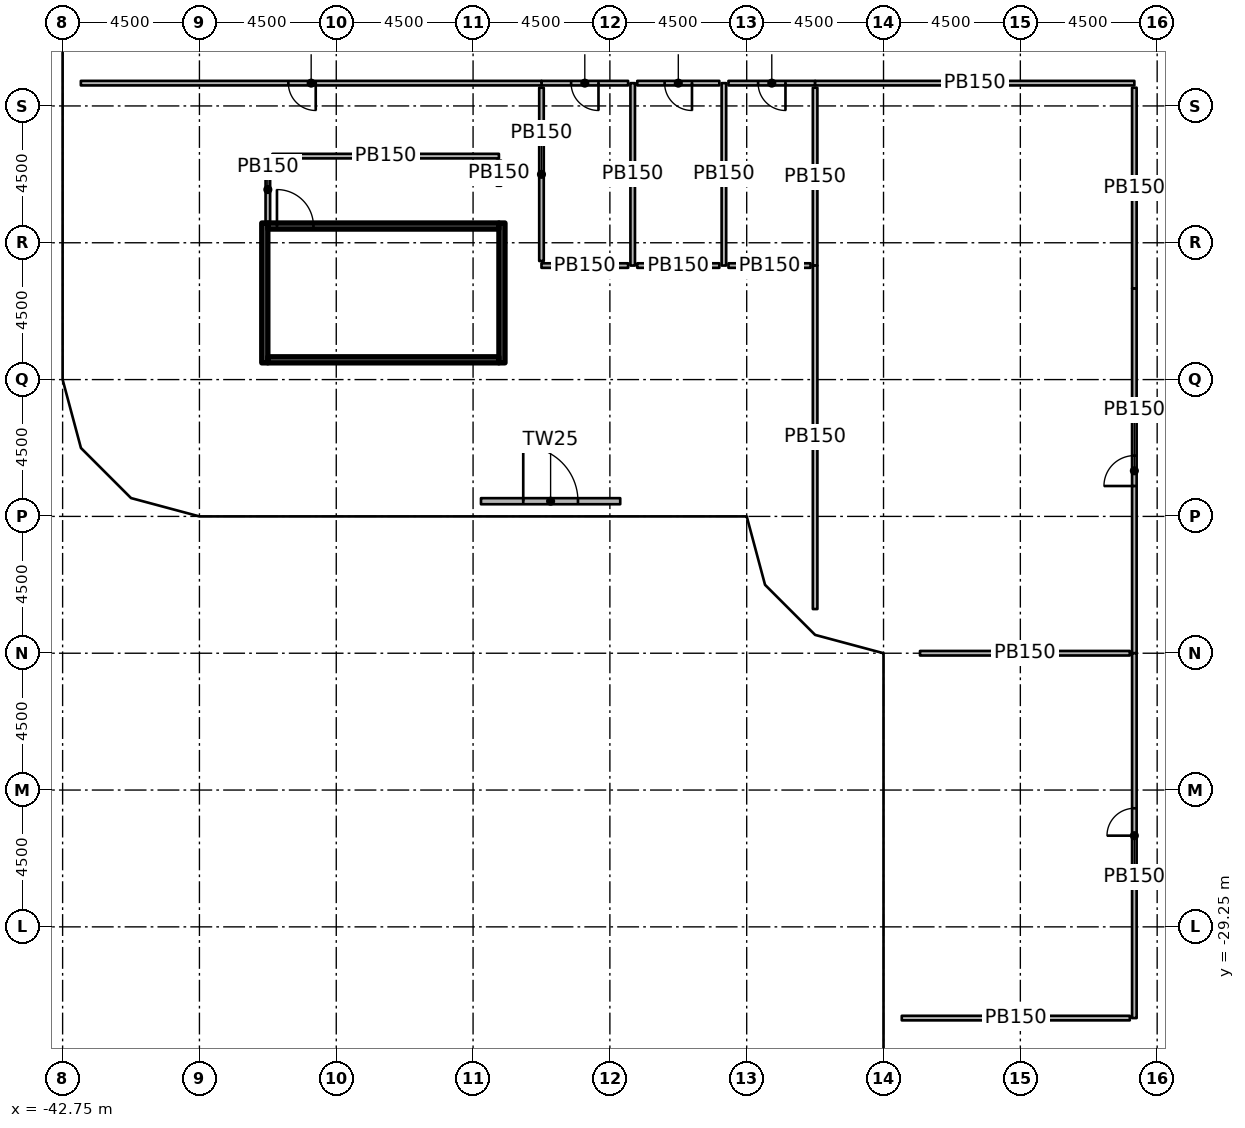
"""IFC4 building model, lengths in metres.
Left out: names, types, materials, properties, quantities, classifications, styles, units other than length and angle.
Written with IfcOpenShell. Run it as: python <this file> out.ifc"""

import sys

from ifc_helpers import new_model, si_unit, direction, frame, frame_2d, origin, origin_2d, place, context, subcontext, project, spatial, rectangle, extrude, element, fill, save


model = new_model("IFC4")
c1 = context("Model", 3, precision=1e-05, world=origin(), true_north=direction((0.0, 1.0)))
c2 = subcontext(c1, "Body", "Model", "MODEL_VIEW")
j1 = project(units=[si_unit("LENGTHUNIT", "METRE"), si_unit("PLANEANGLEUNIT", "RADIAN")], contexts=[c1])
p1 = place(None, origin())
s1 = spatial("IfcSite", under=j1, at=p1, CompositionType="ELEMENT")
p2 = place(p1, origin())
s2 = spatial("IfcBuilding", under=s1, at=p2, CompositionType="ELEMENT")
p3 = place(p2, frame((0.0, 0.0, 17.0)))
s3 = spatial("IfcBuildingStorey", under=s2, at=p3, CompositionType="ELEMENT", Elevation=17.0)
for number, where, z_axis, x_axis in (
    (1, (-33.75, -15.15, 0.0), (0.0, 0.0, 1.0), (1.0, 0.0, 0.0)),
    (2, (-33.11, -2.25, 0.0), (0.0, 0.0, 1.0), (1.0, 0.0, 0.0)),
    (3, (-28.908, -5.475, 0.0), (0.0, 0.0, 1.0), (1.0, 0.0, 0.0)),
    (4, (-24.75, -10.65, 0.0), (0.0, 0.0, 1.0), (1.0, 0.0, 0.0)),
    (5, (-24.75, -6.25, 0.0), (0.0, 0.0, 1.0), (1.0, 0.0, 0.0)),
    (6, (-19.65, -15.15, 0.0), (0.0, 0.0, 1.0), (1.0, 0.0, 0.0)),
    (7, (-20.25, -6.11, 0.0), (0.0, 0.0, 1.0), (1.0, 0.0, 0.0)),
    (8, (-15.15, -33.75, 0.0), (0.0, 0.0, 1.0), (1.0, 0.0, 0.0)),
    (9, (-15.15, -19.65, 0.0), (0.0, 0.0, 1.0), (1.0, 0.0, 0.0)),
    (10, (-15.15, -10.65, 0.0), (0.0, 0.0, 1.0), (1.0, 0.0, 0.0)),
    (11, (-15.75, -6.25, 0.0), (0.0, 0.0, 1.0), (1.0, 0.0, 0.0)),
    (12, (-10.65, -24.75, 0.0), (0.0, 0.0, 1.0), (1.0, 0.0, 0.0)),
    (13, (-10.65, -15.15, 0.0), (0.0, 0.0, 1.0), (1.0, 0.0, 0.0)),
    (14, (-10.75, -6.25, 0.0), (0.0, 0.0, 1.0), (1.0, 0.0, 0.0)),
    (15, (-6.25, -26.9, 0.0), (0.0, 0.0, 1.0), (1.0, 0.0, 0.0)),
    (16, (-6.25, -24.65, 0.0), (0.0, 0.0, 1.0), (1.0, 0.0, 0.0)),
    (17, (-6.25, -20.25, 0.0), (0.0, 0.0, 1.0), (1.0, 0.0, 0.0)),
    (18, (-6.25, -15.75, 0.0), (0.0, 0.0, 1.0), (1.0, 0.0, 0.0)),
    (19, (-6.25, -10.75, 0.0), (0.0, 0.0, 1.0), (1.0, 0.0, 0.0)),
    (20, (-6.25, -6.25, 0.0), (0.0, 0.0, 1.0), (1.0, 0.0, 0.0)),
):
    element("IfcColumn", number, at=place(p3, frame(where, z_axis=z_axis, x_axis=x_axis)), inside=s3, PredefinedType="COLUMN", context=c2, shape_type="SweptSolid", body=[
        extrude(rectangle(XDim=1.2, YDim=1.2, at=origin_2d()), origin(), (0.0, 0.0, 1.0), 4.55),
    ])
p4 = place(p3, frame((-28.99, -15.25, 0.0), z_axis=(0.0, 0.0, 1.0), x_axis=(1.0, 0.0, 0.0)))
e21 = element("IfcWall", 21, at=p4, inside=s3, PredefinedType="SOLIDWALL", context=c2, shape_type="SweptSolid", body=[
    extrude(rectangle(XDim=4.58, YDim=0.2, at=frame_2d((2.29, 0.0))), origin(), (0.0, 0.0, 1.0), 4.55),
])
p5 = place(p4, frame((1.39, 0.0, 0.0)))
e22 = element("IfcOpeningElement", 22, at=p5, cuts=e21, PredefinedType="OPENING", context=c2, shape_type="SweptSolid", body=[
    extrude(rectangle(XDim=1.8, YDim=2.4, at=frame_2d((0.9, 1.2))), frame((0.0, 0.11, 0.0), z_axis=(0.0, -1.0, 0.0), x_axis=(1.0, 0.0, 0.0)), (0.0, 0.0, 1.0), 0.22),
])
for number, where, z_axis, x_axis in (
    (23, (-36.1, -10.7, 0.0), (0.0, 0.0, 1.0), (0.0, 1.0, 0.0)),
    (24, (-28.3, -10.7, 0.0), (0.0, 0.0, 1.0), (0.0, 1.0, 0.0)),
):
    element("IfcWall", number, at=place(p3, frame(where, z_axis=z_axis, x_axis=x_axis)), inside=s3, PredefinedType="SHEAR", context=c2, shape_type="SweptSolid", body=[
        extrude(rectangle(XDim=4.6, YDim=0.2, at=frame_2d((2.3, 0.0))), origin(), (0.0, 0.0, 1.0), 4.55),
    ])
p6 = place(p3, frame((-36.0, -10.6, 0.0), z_axis=(0.0, 0.0, 1.0), x_axis=(1.0, 0.0, 0.0)))
e25 = element("IfcWall", 25, at=p6, inside=s3, PredefinedType="SHEAR", context=c2, shape_type="SweptSolid", body=[
    extrude(rectangle(XDim=7.6, YDim=0.2, at=frame_2d((3.8, 0.0))), origin(), (0.0, 0.0, 1.0), 4.55),
])
p7 = place(p3, frame((-36.0, -6.2, 0.0), z_axis=(0.0, 0.0, 1.0), x_axis=(1.0, 0.0, 0.0)))
e26 = element("IfcWall", 26, at=p7, inside=s3, PredefinedType="SHEAR", context=c2, shape_type="SweptSolid", body=[
    extrude(rectangle(XDim=7.6, YDim=0.2, at=frame_2d((3.8, 0.0))), origin(), (0.0, 0.0, 1.0), 4.55),
])
p8 = place(p7, frame((0.3, 0.0, 0.0)))
e27 = element("IfcOpeningElement", 27, at=p8, cuts=e26, PredefinedType="OPENING", context=c2, shape_type="SweptSolid", body=[
    extrude(rectangle(XDim=1.2, YDim=2.1, at=frame_2d((0.6, 1.05))), frame((0.0, 0.11, 0.0), z_axis=(0.0, -1.0, 0.0), x_axis=(1.0, 0.0, 0.0)), (0.0, 0.0, 1.0), 0.22),
])
p9 = place(p3, frame((-36.0, -6.1, 0.0), z_axis=(0.0, 0.0, 1.0), x_axis=(0.0, 1.0, 0.0)))
e28 = element("IfcWall", 28, at=p9, inside=s3, PredefinedType="PARTITIONING", context=c2, shape_type="SweptSolid", body=[
    extrude(rectangle(XDim=2.2, YDim=0.15, at=frame_2d((1.1, 0.0))), origin(), (0.0, 0.0, 1.0), 4.55),
])
p10 = place(p3, frame((-35.85, -3.9, 0.0), z_axis=(0.0, 0.0, 1.0), x_axis=(1.0, 0.0, 0.0)))
e29 = element("IfcWall", 29, at=p10, inside=s3, PredefinedType="PARTITIONING", context=c2, shape_type="SweptSolid", body=[
    extrude(rectangle(XDim=7.45, YDim=0.15, at=frame_2d((3.725, 0.0))), origin(), (0.0, 0.0, 1.0), 4.55),
])
p11 = place(p3, frame((-28.4, -4.05, 0.0), z_axis=(0.0, 0.0, 1.0), x_axis=(0.0, -1.0, 0.0)))
e30 = element("IfcWall", 30, at=p11, inside=s3, PredefinedType="PARTITIONING", context=c2, shape_type="SweptSolid", body=[
    extrude(rectangle(XDim=0.825, YDim=0.15, at=frame_2d((0.413, 0.0))), origin(), (0.0, 0.0, 1.0), 4.55),
])
p12 = place(p3, frame((-24.0, -1.5, 0.0), z_axis=(0.0, 0.0, 1.0), x_axis=(0.0, -1.0, 0.0)))
e31 = element("IfcWall", 31, at=p12, inside=s3, PredefinedType="PARTITIONING", context=c2, shape_type="SweptSolid", body=[
    extrude(rectangle(XDim=6.0, YDim=0.15, at=frame_2d((3.0, 0.0))), origin(), (0.0, 0.0, 1.0), 4.55),
])
p13 = place(p3, frame((-24.15, -1.5, 0.0), z_axis=(0.0, 0.0, 1.0), x_axis=(-1.0, 0.0, 0.0)))
e32 = element("IfcWall", 32, at=p13, inside=s3, PredefinedType="PARTITIONING", context=c2, shape_type="SweptSolid", body=[
    extrude(rectangle(XDim=2.85, YDim=0.15, at=frame_2d((1.425, 0.0))), origin(), (0.0, 0.0, 1.0), 4.55),
])
p14 = place(p13, frame((0.975, 0.0, 0.0)))
e33 = element("IfcOpeningElement", 33, at=p14, cuts=e32, PredefinedType="OPENING", context=c2, shape_type="SweptSolid", body=[
    extrude(rectangle(XDim=0.9, YDim=2.1, at=frame_2d((0.45, 1.05))), frame((0.0, 0.085, 0.0), z_axis=(0.0, -1.0, 0.0), x_axis=(1.0, 0.0, 0.0)), (0.0, 0.0, 1.0), 0.17),
])
p15 = place(p3, frame((-24.15, -7.5, 0.0), z_axis=(0.0, 0.0, 1.0), x_axis=(-1.0, 0.0, 0.0)))
e34 = element("IfcWall", 34, at=p15, inside=s3, PredefinedType="PARTITIONING", context=c2, shape_type="SweptSolid", body=[
    extrude(rectangle(XDim=2.85, YDim=0.15, at=frame_2d((1.425, 0.0))), origin(), (0.0, 0.0, 1.0), 4.55),
])
p16 = place(p3, frame((-27.0, -7.35, 0.0), z_axis=(0.0, 0.0, 1.0), x_axis=(0.0, 1.0, 0.0)))
e35 = element("IfcWall", 35, at=p16, inside=s3, PredefinedType="PARTITIONING", context=c2, shape_type="SweptSolid", body=[
    extrude(rectangle(XDim=5.7, YDim=0.15, at=frame_2d((2.85, 0.0))), origin(), (0.0, 0.0, 1.0), 4.55),
])
p17 = place(p3, frame((-21.0, -1.5, 0.0), z_axis=(0.0, 0.0, 1.0), x_axis=(0.0, -1.0, 0.0)))
e36 = element("IfcWall", 36, at=p17, inside=s3, PredefinedType="PARTITIONING", context=c2, shape_type="SweptSolid", body=[
    extrude(rectangle(XDim=6.0, YDim=0.15, at=frame_2d((3.0, 0.0))), origin(), (0.0, 0.0, 1.0), 4.55),
])
p18 = place(p3, frame((-21.15, -1.5, 0.0), z_axis=(0.0, 0.0, 1.0), x_axis=(-1.0, 0.0, 0.0)))
e37 = element("IfcWall", 37, at=p18, inside=s3, PredefinedType="PARTITIONING", context=c2, shape_type="SweptSolid", body=[
    extrude(rectangle(XDim=2.7, YDim=0.15, at=frame_2d((1.35, 0.0))), origin(), (0.0, 0.0, 1.0), 4.55),
])
p19 = place(p18, frame((0.9, 0.0, 0.0)))
e38 = element("IfcOpeningElement", 38, at=p19, cuts=e37, PredefinedType="OPENING", context=c2, shape_type="SweptSolid", body=[
    extrude(rectangle(XDim=0.9, YDim=2.1, at=frame_2d((0.45, 1.05))), frame((0.0, 0.085, 0.0), z_axis=(0.0, -1.0, 0.0), x_axis=(1.0, 0.0, 0.0)), (0.0, 0.0, 1.0), 0.17),
])
p20 = place(p3, frame((-21.15, -7.5, 0.0), z_axis=(0.0, 0.0, 1.0), x_axis=(-1.0, 0.0, 0.0)))
e39 = element("IfcWall", 39, at=p20, inside=s3, PredefinedType="PARTITIONING", context=c2, shape_type="SweptSolid", body=[
    extrude(rectangle(XDim=2.7, YDim=0.15, at=frame_2d((1.35, 0.0))), origin(), (0.0, 0.0, 1.0), 4.55),
])
p21 = place(p3, frame((-18.0, -1.5, 0.0), z_axis=(0.0, 0.0, 1.0), x_axis=(-1.0, 0.0, 0.0)))
e40 = element("IfcWall", 40, at=p21, inside=s3, PredefinedType="PARTITIONING", context=c2, shape_type="SweptSolid", body=[
    extrude(rectangle(XDim=2.85, YDim=0.15, at=frame_2d((1.425, 0.0))), origin(), (0.0, 0.0, 1.0), 4.55),
])
p22 = place(p21, frame((0.975, 0.0, 0.0)))
e41 = element("IfcOpeningElement", 41, at=p22, cuts=e40, PredefinedType="OPENING", context=c2, shape_type="SweptSolid", body=[
    extrude(rectangle(XDim=0.9, YDim=2.1, at=frame_2d((0.45, 1.05))), frame((0.0, 0.085, 0.0), z_axis=(0.0, -1.0, 0.0), x_axis=(1.0, 0.0, 0.0)), (0.0, 0.0, 1.0), 0.17),
])
p23 = place(p3, frame((-18.0, -1.65, 0.0), z_axis=(0.0, 0.0, 1.0), x_axis=(0.0, -1.0, 0.0)))
e42 = element("IfcWall", 42, at=p23, inside=s3, PredefinedType="PARTITIONING", context=c2, shape_type="SweptSolid", body=[
    extrude(rectangle(XDim=5.85, YDim=0.15, at=frame_2d((2.925, 0.0))), origin(), (0.0, 0.0, 1.0), 4.55),
])
p24 = place(p3, frame((-18.15, -7.5, 0.0), z_axis=(0.0, 0.0, 1.0), x_axis=(-1.0, 0.0, 0.0)))
e43 = element("IfcWall", 43, at=p24, inside=s3, PredefinedType="PARTITIONING", context=c2, shape_type="SweptSolid", body=[
    extrude(rectangle(XDim=2.7, YDim=0.15, at=frame_2d((1.35, 0.0))), origin(), (0.0, 0.0, 1.0), 4.55),
])
p25 = place(p3, frame((-7.5, -20.25, 0.0), z_axis=(0.0, 0.0, 1.0), x_axis=(0.0, 1.0, 0.0)))
e44 = element("IfcWall", 44, at=p25, inside=s3, PredefinedType="PARTITIONING", context=c2, shape_type="SweptSolid", body=[
    extrude(rectangle(XDim=12.0, YDim=0.15, at=frame_2d((6.0, 0.0))), origin(), (0.0, 0.0, 1.0), 4.55),
])
p26 = place(p25, frame((5.5, 0.0, 0.0)))
e45 = element("IfcOpeningElement", 45, at=p26, cuts=e44, PredefinedType="OPENING", context=c2, shape_type="SweptSolid", body=[
    extrude(rectangle(XDim=1.0, YDim=2.1, at=frame_2d((0.5, 1.05))), frame((0.0, 0.085, 0.0), z_axis=(0.0, -1.0, 0.0), x_axis=(1.0, 0.0, 0.0)), (0.0, 0.0, 1.0), 0.17),
])
p27 = place(p3, frame((-7.5, -32.25, 0.0), z_axis=(0.0, 0.0, 1.0), x_axis=(0.0, 1.0, 0.0)))
e46 = element("IfcWall", 46, at=p27, inside=s3, PredefinedType="PARTITIONING", context=c2, shape_type="SweptSolid", body=[
    extrude(rectangle(XDim=12.0, YDim=0.15, at=frame_2d((6.0, 0.0))), origin(), (0.0, 0.0, 1.0), 4.55),
])
p28 = place(p27, frame((6.0, 0.0, 0.0)))
e47 = element("IfcOpeningElement", 47, at=p28, cuts=e46, PredefinedType="OPENING", context=c2, shape_type="SweptSolid", body=[
    extrude(rectangle(XDim=0.9, YDim=2.1, at=frame_2d((0.45, 1.05))), frame((0.0, 0.085, 0.0), z_axis=(0.0, -1.0, 0.0), x_axis=(1.0, 0.0, 0.0)), (0.0, 0.0, 1.0), 0.17),
])
p29 = place(p3, frame((-7.5, -1.5, 0.0), z_axis=(0.0, 0.0, 1.0), x_axis=(-1.0, 0.0, 0.0)))
e48 = element("IfcWall", 48, at=p29, inside=s3, PredefinedType="PARTITIONING", context=c2, shape_type="SweptSolid", body=[
    extrude(rectangle(XDim=10.5, YDim=0.15, at=frame_2d((5.25, 0.0))), origin(), (0.0, 0.0, 1.0), 4.55),
])
p30 = place(p3, frame((-27.0, -1.5, 0.0), z_axis=(0.0, 0.0, 1.0), x_axis=(-1.0, 0.0, 0.0)))
e49 = element("IfcWall", 49, at=p30, inside=s3, PredefinedType="PARTITIONING", context=c2, shape_type="SweptSolid", body=[
    extrude(rectangle(XDim=15.15, YDim=0.15, at=frame_2d((7.575, 0.0))), origin(), (0.0, 0.0, 1.0), 4.55),
])
p31 = place(p30, frame((7.425, 0.0, 0.0)))
e50 = element("IfcOpeningElement", 50, at=p31, cuts=e49, PredefinedType="OPENING", context=c2, shape_type="SweptSolid", body=[
    extrude(rectangle(XDim=0.9, YDim=2.1, at=frame_2d((0.45, 1.05))), frame((0.0, 0.085, 0.0), z_axis=(0.0, -1.0, 0.0), x_axis=(1.0, 0.0, 0.0)), (0.0, 0.0, 1.0), 0.17),
])
p32 = place(p3, frame((-18.0, -18.797, 0.0), z_axis=(0.0, 0.0, 1.0), x_axis=(0.0, 1.0, 0.0)))
e51 = element("IfcWall", 51, at=p32, inside=s3, PredefinedType="PARTITIONING", context=c2, shape_type="SweptSolid", body=[
    extrude(rectangle(XDim=11.297, YDim=0.15, at=frame_2d((5.648, 0.0))), origin(), (0.0, 0.0, 1.0), 4.55),
])
p33 = place(p3, frame((-7.65, -20.25, 0.0), z_axis=(0.0, 0.0, 1.0), x_axis=(-1.0, 0.0, 0.0)))
e52 = element("IfcWall", 52, at=p33, inside=s3, PredefinedType="PARTITIONING", context=c2, shape_type="SweptSolid", body=[
    extrude(rectangle(XDim=6.9, YDim=0.15, at=frame_2d((3.45, 0.0))), origin(), (0.0, 0.0, 1.0), 4.55),
])
p34 = place(p3, frame((-7.5, -1.65, 0.0), z_axis=(0.0, 0.0, 1.0), x_axis=(0.0, -1.0, 0.0)))
e53 = element("IfcWall", 53, at=p34, inside=s3, PredefinedType="PARTITIONING", context=c2, shape_type="SweptSolid", body=[
    extrude(rectangle(XDim=6.6, YDim=0.15, at=frame_2d((3.3, 0.0))), origin(), (0.0, 0.0, 1.0), 4.55),
])
p35 = place(p3, frame((-7.65, -32.25, 0.0), z_axis=(0.0, 0.0, 1.0), x_axis=(-1.0, 0.0, 0.0)))
e54 = element("IfcWall", 54, at=p35, inside=s3, PredefinedType="PARTITIONING", context=c2, shape_type="SweptSolid", body=[
    extrude(rectangle(XDim=7.5, YDim=0.15, at=frame_2d((3.75, 0.0))), origin(), (0.0, 0.0, 1.0), 4.55),
])
p36 = place(p5, origin())
e55 = element("IfcDoor", 55, at=p36, inside=s3, OperationType="SINGLE_SWING_LEFT", PredefinedType="DOOR", context=c2, shape_type="SweptSolid", body=[
    extrude(rectangle(XDim=1.8, YDim=2.4, at=frame_2d((0.9, 1.2))), frame((0.0, 0.025, 0.0), z_axis=(0.0, -1.0, 0.0), x_axis=(1.0, 0.0, 0.0)), (0.0, 0.0, 1.0), 0.05),
])
fill(e22, e55)
p37 = place(p8, origin())
e56 = element("IfcDoor", 56, at=p37, inside=s3, OperationType="SINGLE_SWING_RIGHT", PredefinedType="DOOR", context=c2, shape_type="SweptSolid", body=[
    extrude(rectangle(XDim=1.2, YDim=2.1, at=frame_2d((0.6, 1.05))), frame((0.0, 0.025, 0.0), z_axis=(0.0, -1.0, 0.0), x_axis=(1.0, 0.0, 0.0)), (0.0, 0.0, 1.0), 0.05),
])
fill(e27, e56)
p38 = place(p14, origin())
e57 = element("IfcDoor", 57, at=p38, inside=s3, OperationType="SINGLE_SWING_LEFT", PredefinedType="DOOR", context=c2, shape_type="SweptSolid", body=[
    extrude(rectangle(XDim=0.9, YDim=2.1, at=frame_2d((0.45, 1.05))), frame((0.0, 0.025, 0.0), z_axis=(0.0, -1.0, 0.0), x_axis=(1.0, 0.0, 0.0)), (0.0, 0.0, 1.0), 0.05),
])
fill(e33, e57)
p39 = place(p19, origin())
e58 = element("IfcDoor", 58, at=p39, inside=s3, OperationType="SINGLE_SWING_LEFT", PredefinedType="DOOR", context=c2, shape_type="SweptSolid", body=[
    extrude(rectangle(XDim=0.9, YDim=2.1, at=frame_2d((0.45, 1.05))), frame((0.0, 0.025, 0.0), z_axis=(0.0, -1.0, 0.0), x_axis=(1.0, 0.0, 0.0)), (0.0, 0.0, 1.0), 0.05),
])
fill(e38, e58)
p40 = place(p22, origin())
e59 = element("IfcDoor", 59, at=p40, inside=s3, OperationType="SINGLE_SWING_LEFT", PredefinedType="DOOR", context=c2, shape_type="SweptSolid", body=[
    extrude(rectangle(XDim=0.9, YDim=2.1, at=frame_2d((0.45, 1.05))), frame((0.0, 0.025, 0.0), z_axis=(0.0, -1.0, 0.0), x_axis=(1.0, 0.0, 0.0)), (0.0, 0.0, 1.0), 0.05),
])
fill(e41, e59)
p41 = place(p26, origin())
e60 = element("IfcDoor", 60, at=p41, inside=s3, OperationType="SINGLE_SWING_LEFT", PredefinedType="DOOR", context=c2, shape_type="SweptSolid", body=[
    extrude(rectangle(XDim=1.0, YDim=2.1, at=frame_2d((0.5, 1.05))), frame((0.0, 0.025, 0.0), z_axis=(0.0, -1.0, 0.0), x_axis=(1.0, 0.0, 0.0)), (0.0, 0.0, 1.0), 0.05),
])
fill(e45, e60)
p42 = place(p28, origin())
e61 = element("IfcDoor", 61, at=p42, inside=s3, OperationType="SINGLE_SWING_LEFT", PredefinedType="DOOR", context=c2, shape_type="SweptSolid", body=[
    extrude(rectangle(XDim=0.9, YDim=2.1, at=frame_2d((0.45, 1.05))), frame((0.0, 0.025, 0.0), z_axis=(0.0, -1.0, 0.0), x_axis=(1.0, 0.0, 0.0)), (0.0, 0.0, 1.0), 0.05),
])
fill(e47, e61)
p43 = place(p31, origin())
e62 = element("IfcDoor", 62, at=p43, inside=s3, OperationType="SINGLE_SWING_LEFT", PredefinedType="DOOR", context=c2, shape_type="SweptSolid", body=[
    extrude(rectangle(XDim=0.9, YDim=2.1, at=frame_2d((0.45, 1.05))), frame((0.0, 0.025, 0.0), z_axis=(0.0, -1.0, 0.0), x_axis=(1.0, 0.0, 0.0)), (0.0, 0.0, 1.0), 0.05),
])
fill(e50, e62)
save(model, sys.argv[1])
